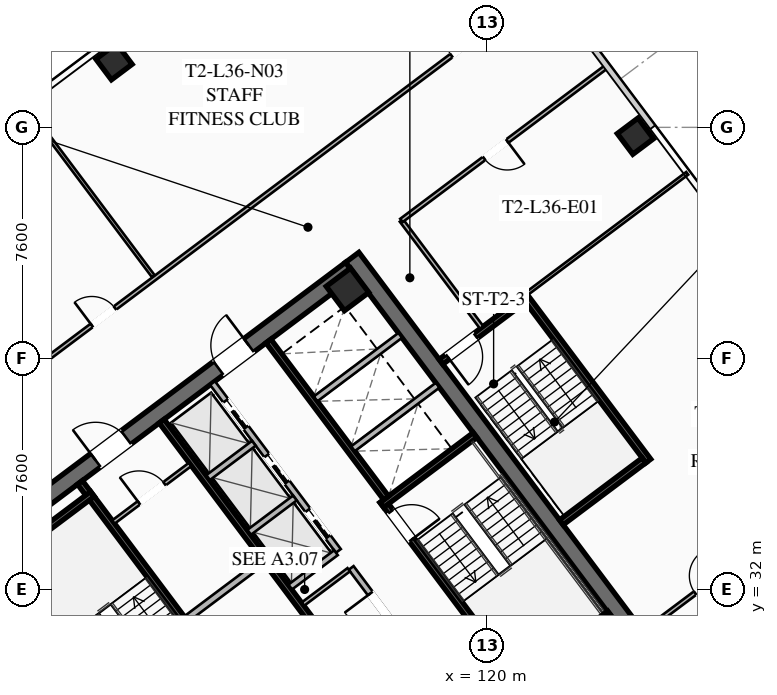
"""IFC4 building model, lengths in metres.
Left out: names, types, materials, properties, quantities, classifications, styles, units other than length and angle.
Written with IfcOpenShell. Run it as: python <this file> out.ifc"""

import sys

from ifc_helpers import new_model, si_unit, direction, frame, frame_2d, origin, origin_2d, place, context, subcontext, project, spatial, rectangle, hollow_rectangle, extrude, element, fill, save


model = new_model("IFC4")
c1 = context("Model", 3, precision=1e-05, world=origin(), true_north=direction((0.0, 1.0)))
c2 = subcontext(c1, "Body", "Model", "MODEL_VIEW")
j1 = project(units=[si_unit("LENGTHUNIT", "METRE"), si_unit("PLANEANGLEUNIT", "RADIAN")], contexts=[c1])
p1 = place(None, origin())
s1 = spatial("IfcSite", under=j1, at=p1, CompositionType="ELEMENT")
p2 = place(p1, origin())
s2 = spatial("IfcBuilding", under=s1, at=p2, CompositionType="ELEMENT")
p3 = place(p2, frame((0.0, 0.0, 135.7)))
s3 = spatial("IfcBuildingStorey", under=s2, at=p3, CompositionType="ELEMENT", Elevation=135.7)
for number, where, z_axis, x_axis in (
    (1, (112.436, 21.077, 0.0), (0.0, 0.0, 1.0), (-0.6, 0.8, 0.0)),
    (2, (115.564, 42.923, 0.0), (0.0, 0.0, 1.0), (0.6, -0.8, 0.0)),
):
    element("IfcWall", number, at=place(p3, frame(where, z_axis=z_axis, x_axis=x_axis)), inside=s3, PredefinedType="SHEAR", context=c2, shape_type="SweptSolid", body=[
        extrude(rectangle(XDim=15.6, YDim=0.55, at=frame_2d((7.8, 0.0))), origin(), (0.0, 0.0, 1.0), 3.55),
    ])
p4 = place(p3, frame((103.461, 33.502, 0.0), z_axis=(0.0, 0.0, 1.0), x_axis=(0.799998054672, 0.600002593761, 0.0)))
e3 = element("IfcWall", 3, at=p4, inside=s3, PredefinedType="SHEAR", context=c2, shape_type="SweptSolid", body=[
    extrude(rectangle(XDim=15.06, YDim=0.55, at=frame_2d((7.53, 0.0))), origin(), (0.0, 0.0, 1.0), 3.55),
])
p5 = place(p4, frame((4.58, 0.0, 0.0)))
e4 = element("IfcOpeningElement", 4, at=p5, cuts=e3, PredefinedType="OPENING", context=c2, shape_type="SweptSolid", body=[
    extrude(rectangle(XDim=1.25, YDim=2.25, at=frame_2d((0.625, 1.125))), frame((0.0, 0.285, 0.0), z_axis=(0.0, -1.0, 0.0), x_axis=(1.0, 0.0, 0.0)), (0.0, 0.0, 1.0), 0.57),
])
p6 = place(p4, frame((9.63, 0.0, 0.0)))
e5 = element("IfcOpeningElement", 5, at=p6, cuts=e3, PredefinedType="OPENING", context=c2, shape_type="SweptSolid", body=[
    extrude(rectangle(XDim=1.25, YDim=2.25, at=frame_2d((0.625, 1.125))), frame((0.0, 0.285, 0.0), z_axis=(0.0, -1.0, 0.0), x_axis=(1.0, 0.0, 0.0)), (0.0, 0.0, 1.0), 0.57),
])
for number, where, z_axis, x_axis in (
    (6, (123.87, 30.59, 0.0), (0.0, 0.0, 1.0), (0.8, 0.6, 0.0)),
    (7, (115.41, 41.87, 0.0), (0.0, 0.0, 1.0), (0.8, 0.6, 0.0)),
):
    element("IfcColumn", number, at=place(p3, frame(where, z_axis=z_axis, x_axis=x_axis)), inside=s3, PredefinedType="COLUMN", context=c2, shape_type="SweptSolid", body=[
        extrude(hollow_rectangle(XDim=1.0, YDim=1.0, WallThickness=0.04, at=origin_2d()), origin(), (0.0, 0.0, 1.0), 3.37),
    ])
for number, where, z_axis, x_axis in (
    (8, (124.88, 46.91, 0.0), (0.0, 0.0, 1.0), (0.8, 0.6, 0.0)),
    (9, (107.73, 49.36, 0.0), (0.0, 0.0, 1.0), (0.8, 0.6, 0.0)),
):
    element("IfcColumn", number, at=place(p3, frame(where, z_axis=z_axis, x_axis=x_axis)), inside=s3, PredefinedType="COLUMN", context=c2, shape_type="SweptSolid", body=[
        extrude(hollow_rectangle(XDim=0.85, YDim=0.85, WallThickness=0.035, at=origin_2d()), origin(), (0.0, 0.0, 1.0), 3.37),
    ])
p7 = place(p3, frame((111.44, 29.08, 0.0), z_axis=(0.0, 0.0, 1.0), x_axis=(-0.59999029481, 0.8000072788, 0.0)))
e10 = element("IfcWall", 10, at=p7, inside=s3, PredefinedType="SHEAR", context=c2, shape_type="SweptSolid", body=[
    extrude(rectangle(XDim=8.05, YDim=0.2, at=frame_2d((4.025, 0.0))), origin(), (0.0, 0.0, 1.0), 3.37),
])
p8 = place(p7, frame((0.45, 0.0, 0.0)))
e11 = element("IfcOpeningElement", 11, at=p8, cuts=e10, PredefinedType="OPENING", context=c2, shape_type="SweptSolid", body=[
    extrude(rectangle(XDim=1.15, YDim=2.2, at=frame_2d((0.575, 1.1))), frame((0.0, 0.11, 0.0), z_axis=(0.0, -1.0, 0.0), x_axis=(1.0, 0.0, 0.0)), (0.0, 0.0, 1.0), 0.22),
])
p9 = place(p3, frame((103.956, 32.842, 0.0), z_axis=(0.0, 0.0, 1.0), x_axis=(0.800015298837, 0.599979601008, 0.0)))
e12 = element("IfcWall", 12, at=p9, inside=s3, PredefinedType="SHEAR", context=c2, shape_type="SweptSolid", body=[
    extrude(rectangle(XDim=3.83, YDim=0.2, at=frame_2d((1.915, 0.0))), origin(), (0.0, 0.0, 1.0), 3.37),
])
p10 = place(p3, frame((116.56, 34.92, 0.0), z_axis=(0.0, 0.0, 1.0), x_axis=(0.59999029481, -0.8000072788, 0.0)))
e13 = element("IfcWall", 13, at=p10, inside=s3, PredefinedType="SHEAR", context=c2, shape_type="SweptSolid", body=[
    extrude(rectangle(XDim=8.05, YDim=0.2, at=frame_2d((4.025, 0.0))), origin(), (0.0, 0.0, 1.0), 3.37),
])
p11 = place(p10, frame((0.45, 0.0, 0.0)))
e14 = element("IfcOpeningElement", 14, at=p11, cuts=e13, PredefinedType="OPENING", context=c2, shape_type="SweptSolid", body=[
    extrude(rectangle(XDim=1.15, YDim=2.2, at=frame_2d((0.575, 1.1))), frame((0.0, 0.11, 0.0), z_axis=(0.0, -1.0, 0.0), x_axis=(1.0, 0.0, 0.0)), (0.0, 0.0, 1.0), 0.22),
])
for number, where, z_axis, x_axis in (
    (15, (116.54, 34.78, 0.0), (0.0, 0.0, 1.0), (0.8, 0.6, 0.0)),
    (16, (120.98, 28.86, 0.0), (0.0, 0.0, 1.0), (0.8, 0.6, 0.0)),
):
    element("IfcWall", number, at=place(p3, frame(where, z_axis=z_axis, x_axis=x_axis)), inside=s3, PredefinedType="SHEAR", context=c2, shape_type="SweptSolid", body=[
        extrude(rectangle(XDim=3.83, YDim=0.2, at=frame_2d((1.915, 0.0))), origin(), (0.0, 0.0, 1.0), 3.37),
    ])
p12 = place(p3, frame((117.998, 25.936, 0.0), z_axis=(0.0, 0.0, 1.0), x_axis=(-0.600002693989, 0.799997979501, 0.0)))
e17 = element("IfcWall", 17, at=p12, inside=s3, PredefinedType="SHEAR", context=c2, shape_type="SweptSolid", body=[
    extrude(rectangle(XDim=14.5, YDim=0.2, at=frame_2d((7.25, 0.0))), origin(), (0.0, 0.0, 1.0), 3.37),
])
p13 = place(p3, frame((110.104, 31.028, 0.0), z_axis=(0.0, 0.0, 1.0), x_axis=(0.800018601094, 0.59997519774, 0.0)))
e18 = element("IfcWall", 18, at=p13, inside=s3, PredefinedType="SOLIDWALL", context=c2, shape_type="SweptSolid", body=[
    extrude(rectangle(XDim=3.15, YDim=0.22, at=frame_2d((1.575, 0.0))), origin(), (0.0, 0.0, 1.0), 2.723),
])
p14 = place(p3, frame((112.81, 40.17, 0.0), z_axis=(0.0, 0.0, 1.0), x_axis=(0.599993943644, -0.800004542231, 0.0)))
e19 = element("IfcWall", 19, at=p14, inside=s3, PredefinedType="SHEAR", context=c2, shape_type="SweptSolid", body=[
    extrude(rectangle(XDim=6.45, YDim=0.2, at=frame_2d((3.225, 0.0))), origin(), (0.0, 0.0, 1.0), 3.37),
])
for number, where, z_axis, x_axis in (
    (20, (115.59, 36.63, 0.0), (0.0, 0.0, 1.0), (0.8, 0.6, 0.0)),
    (21, (114.36, 38.27, 0.0), (0.0, 0.0, 1.0), (0.8, 0.6, 0.0)),
):
    element("IfcWall", number, at=place(p3, frame(where, z_axis=z_axis, x_axis=x_axis)), inside=s3, PredefinedType="SOLIDWALL", context=c2, shape_type="SweptSolid", body=[
        extrude(rectangle(XDim=3.48, YDim=0.2, at=frame_2d((1.74, 0.0))), origin(), (0.0, 0.0, 1.0), 3.37),
    ])
p15 = place(p3, frame((107.71, 34.22, 0.0), z_axis=(0.0, 0.0, 1.0), x_axis=(0.799981399002, 0.60002480053, 0.0)))
e22 = element("IfcWall", 22, at=p15, inside=s3, PredefinedType="PARTITIONING", context=c2, shape_type="SweptSolid", body=[
    extrude(rectangle(XDim=3.15, YDim=0.135, at=frame_2d((1.575, 0.0))), origin(), (0.0, 0.0, 1.0), 2.723),
])
p16 = place(p15, frame((1.05, 0.0, 0.0)))
e23 = element("IfcOpeningElement", 23, at=p16, cuts=e22, PredefinedType="OPENING", context=c2, shape_type="SweptSolid", body=[
    extrude(rectangle(XDim=1.05, YDim=2.2, at=frame_2d((0.525, 1.1))), frame((0.0, 0.077, 0.0), z_axis=(0.0, -1.0, 0.0), x_axis=(1.0, 0.0, 0.0)), (0.0, 0.0, 1.0), 0.155),
])
p17 = place(p3, frame((119.67, 27.19, 0.0), z_axis=(0.0, 0.0, 1.0), x_axis=(-0.599988677396, 0.800008491828, 0.0)))
e24 = element("IfcWall", 24, at=p17, inside=s3, PredefinedType="SOLIDWALL", context=c2, shape_type="SweptSolid", body=[
    extrude(rectangle(XDim=6.9, YDim=0.2, at=frame_2d((3.45, 0.0))), origin(), (0.0, 0.0, 1.0), 2.723),
])
p18 = place(p17, frame((0.85, 0.0, 0.0)))
e25 = element("IfcOpeningElement", 25, at=p18, cuts=e24, PredefinedType="OPENING", context=c2, shape_type="SweptSolid", body=[
    extrude(rectangle(XDim=0.95, YDim=2.05, at=frame_2d((0.475, 1.025))), frame((0.0, 0.11, 0.0), z_axis=(0.0, -1.0, 0.0), x_axis=(1.0, 0.0, 0.0)), (0.0, 0.0, 1.0), 0.22),
])
p19 = place(p17, frame((4.8, 0.0, 0.0)))
e26 = element("IfcOpeningElement", 26, at=p19, cuts=e24, PredefinedType="OPENING", context=c2, shape_type="SweptSolid", body=[
    extrude(rectangle(XDim=1.05, YDim=2.2, at=frame_2d((0.525, 1.1))), frame((0.0, 0.11, 0.0), z_axis=(0.0, -1.0, 0.0), x_axis=(1.0, 0.0, 0.0)), (0.0, 0.0, 1.0), 0.22),
])
p20 = place(p3, frame((113.946, 31.522, 0.0), z_axis=(0.0, 0.0, 1.0), x_axis=(0.8, 0.6, 0.0)))
e27 = element("IfcWall", 27, at=p20, inside=s3, PredefinedType="PARTITIONING", context=c2, shape_type="SweptSolid", body=[
    extrude(rectangle(XDim=1.88, YDim=0.135, at=frame_2d((0.94, 0.0))), origin(), (0.0, 0.0, 1.0), 2.723),
])
p21 = place(p3, frame((115.11, 33.27, 0.0), z_axis=(0.0, 0.0, 1.0), x_axis=(-0.600011322243, 0.799991508192, 0.0)))
e28 = element("IfcWall", 28, at=p21, inside=s3, PredefinedType="SOLIDWALL", context=c2, shape_type="SweptSolid", body=[
    extrude(rectangle(XDim=6.9, YDim=0.2, at=frame_2d((3.45, 0.0))), origin(), (0.0, 0.0, 1.0), 3.37),
])
p22 = place(p21, frame((0.575, 0.0, 0.0)))
e29 = element("IfcOpeningElement", 29, at=p22, cuts=e28, PredefinedType="OPENING", context=c2, shape_type="SweptSolid", body=[
    extrude(rectangle(XDim=1.1, YDim=2.2, at=frame_2d((0.55, 1.1))), frame((0.0, 0.11, 0.0), z_axis=(0.0, -1.0, 0.0), x_axis=(1.0, 0.0, 0.0)), (0.0, 0.0, 1.0), 0.22),
])
p23 = place(p21, frame((2.825, 0.0, 0.0)))
e30 = element("IfcOpeningElement", 30, at=p23, cuts=e28, PredefinedType="OPENING", context=c2, shape_type="SweptSolid", body=[
    extrude(rectangle(XDim=1.1, YDim=2.2, at=frame_2d((0.55, 1.1))), frame((0.0, 0.11, 0.0), z_axis=(0.0, -1.0, 0.0), x_axis=(1.0, 0.0, 0.0)), (0.0, 0.0, 1.0), 0.22),
])
p24 = place(p21, frame((5.075, 0.0, 0.0)))
e31 = element("IfcOpeningElement", 31, at=p24, cuts=e28, PredefinedType="OPENING", context=c2, shape_type="SweptSolid", body=[
    extrude(rectangle(XDim=1.1, YDim=2.2, at=frame_2d((0.55, 1.1))), frame((0.0, 0.11, 0.0), z_axis=(0.0, -1.0, 0.0), x_axis=(1.0, 0.0, 0.0)), (0.0, 0.0, 1.0), 0.22),
])
p25 = place(p3, frame((113.526, 32.082, 0.0), z_axis=(0.0, 0.0, 1.0), x_axis=(0.800046745961, 0.599937666993, 0.0)))
e32 = element("IfcWall", 32, at=p25, inside=s3, PredefinedType="SOLIDWALL", context=c2, shape_type="SweptSolid", body=[
    extrude(rectangle(XDim=1.88, YDim=0.2, at=frame_2d((0.94, 0.0))), origin(), (0.0, 0.0, 1.0), 3.37),
])
p26 = place(p3, frame((112.176, 33.882, 0.0), z_axis=(0.0, 0.0, 1.0), x_axis=(0.8, 0.6, 0.0)))
e33 = element("IfcWall", 33, at=p26, inside=s3, PredefinedType="SOLIDWALL", context=c2, shape_type="SweptSolid", body=[
    extrude(rectangle(XDim=1.88, YDim=0.2, at=frame_2d((0.94, 0.0))), origin(), (0.0, 0.0, 1.0), 3.37),
])
p27 = place(p3, frame((110.826, 35.682, 0.0), z_axis=(0.0, 0.0, 1.0), x_axis=(0.799984418148, 0.600020775241, 0.0)))
e34 = element("IfcWall", 34, at=p27, inside=s3, PredefinedType="SOLIDWALL", context=c2, shape_type="SweptSolid", body=[
    extrude(rectangle(XDim=1.88, YDim=0.2, at=frame_2d((0.94, 0.0))), origin(), (0.0, 0.0, 1.0), 3.37),
])
p28 = place(p3, frame((125.304, 36.228, 0.0), z_axis=(0.0, 0.0, 1.0), x_axis=(-0.59998851072, 0.800008616831, 0.0)))
e35 = element("IfcWall", 35, at=p28, inside=s3, PredefinedType="SHEAR", context=c2, shape_type="SweptSolid", body=[
    extrude(rectangle(XDim=6.8, YDim=0.2, at=frame_2d((3.4, 0.0))), origin(), (0.0, 0.0, 1.0), 3.37),
])
p29 = place(p3, frame((121.204, 41.528, 0.0), z_axis=(0.0, 0.0, 1.0), x_axis=(-0.800017232136, -0.599977023131, 0.0)))
e36 = element("IfcWall", 36, at=p29, inside=s3, PredefinedType="SHEAR", context=c2, shape_type="SweptSolid", body=[
    extrude(rectangle(XDim=3.4, YDim=0.2, at=frame_2d((1.7, 0.0))), origin(), (0.0, 0.0, 1.0), 3.37),
])
p30 = place(p29, frame((1.975, 0.0, 0.0)))
e37 = element("IfcOpeningElement", 37, at=p30, cuts=e36, PredefinedType="OPENING", context=c2, shape_type="SweptSolid", body=[
    extrude(rectangle(XDim=1.15, YDim=2.2, at=frame_2d((0.575, 1.1))), frame((0.0, 0.11, 0.0), z_axis=(0.0, -1.0, 0.0), x_axis=(1.0, 0.0, 0.0)), (0.0, 0.0, 1.0), 0.22),
])
p31 = place(p3, frame((122.444, 34.208, 0.0), z_axis=(0.0, 0.0, 1.0), x_axis=(0.79999138319, 0.600011488909, 0.0)))
e38 = element("IfcWall", 38, at=p31, inside=s3, PredefinedType="SHEAR", context=c2, shape_type="SweptSolid", body=[
    extrude(rectangle(XDim=3.4, YDim=0.2, at=frame_2d((1.7, 0.0))), origin(), (0.0, 0.0, 1.0), 3.37),
])
p32 = place(p3, frame((119.824, 40.618, 0.0), z_axis=(0.0, 0.0, 1.0), x_axis=(-0.599982243973, 0.800013316712, 0.0)))
e39 = element("IfcWall", 39, at=p32, inside=s3, PredefinedType="PARTITIONING", context=c2, shape_type="SweptSolid", body=[
    extrude(rectangle(XDim=4.4, YDim=0.135, at=frame_2d((2.2, 0.0))), origin(), (0.0, 0.0, 1.0), 2.723),
])
p33 = place(p3, frame((94.79, 31.53, 0.0), z_axis=(0.0, 0.0, 1.0), x_axis=(0.8, 0.6, 0.0)))
e40 = element("IfcWall", 40, at=p33, inside=s3, PredefinedType="PARTITIONING", context=c2, shape_type="SweptSolid", body=[
    extrude(rectangle(XDim=31.3, YDim=0.135, at=frame_2d((15.65, 0.0))), origin(), (0.0, 0.0, 1.0), 2.723),
])
p34 = place(p33, frame((0.3, 0.0, 0.0)))
e41 = element("IfcOpeningElement", 41, at=p34, cuts=e40, PredefinedType="OPENING", context=c2, shape_type="SweptSolid", body=[
    extrude(rectangle(XDim=0.95, YDim=2.05, at=frame_2d((0.475, 1.025))), frame((0.0, 0.077, 0.0), z_axis=(0.0, -1.0, 0.0), x_axis=(1.0, 0.0, 0.0)), (0.0, 0.0, 1.0), 0.155),
])
p35 = place(p33, frame((15.263, 0.0, 0.0)))
e42 = element("IfcOpeningElement", 42, at=p35, cuts=e40, PredefinedType="OPENING", context=c2, shape_type="SweptSolid", body=[
    extrude(rectangle(XDim=0.95, YDim=2.05, at=frame_2d((0.475, 1.025))), frame((0.0, 0.077, 0.0), z_axis=(0.0, -1.0, 0.0), x_axis=(1.0, 0.0, 0.0)), (0.0, 0.0, 1.0), 0.155),
])
p36 = place(p33, frame((30.05, 0.0, 0.0)))
e43 = element("IfcOpeningElement", 43, at=p36, cuts=e40, PredefinedType="OPENING", context=c2, shape_type="SweptSolid", body=[
    extrude(rectangle(XDim=0.95, YDim=2.05, at=frame_2d((0.475, 1.025))), frame((0.0, 0.077, 0.0), z_axis=(0.0, -1.0, 0.0), x_axis=(1.0, 0.0, 0.0)), (0.0, 0.0, 1.0), 0.155),
])
p37 = place(p3, frame((109.022, 42.304, 0.0), z_axis=(0.0, 0.0, 1.0), x_axis=(-0.599988918536, 0.800008310978, 0.0)))
e44 = element("IfcWall", 44, at=p37, inside=s3, PredefinedType="PARTITIONING", context=c2, shape_type="SweptSolid", body=[
    extrude(rectangle(XDim=7.05, YDim=0.11, at=frame_2d((3.525, 0.0))), origin(), (0.0, 0.0, 1.0), 2.723),
])
p38 = place(p3, frame((133.102, 32.614, 0.0), z_axis=(0.0, 0.0, 1.0), x_axis=(-0.8, -0.6, 0.0)))
e45 = element("IfcWall", 45, at=p38, inside=s3, PredefinedType="PARTITIONING", context=c2, shape_type="SweptSolid", body=[
    extrude(rectangle(XDim=31.3, YDim=0.135, at=frame_2d((15.65, 0.0))), origin(), (0.0, 0.0, 1.0), 2.723),
])
p39 = place(p38, frame((29.97, 0.0, 0.0)))
e46 = element("IfcOpeningElement", 46, at=p39, cuts=e45, PredefinedType="OPENING", context=c2, shape_type="SweptSolid", body=[
    extrude(rectangle(XDim=0.95, YDim=2.05, at=frame_2d((0.475, 1.025))), frame((0.0, 0.077, 0.0), z_axis=(0.0, -1.0, 0.0), x_axis=(1.0, 0.0, 0.0)), (0.0, 0.0, 1.0), 0.155),
])
p40 = place(p38, frame((0.38, 0.0, 0.0)))
e47 = element("IfcOpeningElement", 47, at=p40, cuts=e45, PredefinedType="OPENING", context=c2, shape_type="SweptSolid", body=[
    extrude(rectangle(XDim=0.95, YDim=2.05, at=frame_2d((0.475, 1.025))), frame((0.0, 0.077, 0.0), z_axis=(0.0, -1.0, 0.0), x_axis=(1.0, 0.0, 0.0)), (0.0, 0.0, 1.0), 0.155),
])
p41 = place(p3, frame((123.944, 49.208, 0.0), z_axis=(0.0, 0.0, 1.0), x_axis=(-0.799996532921, -0.600004622744, 0.0)))
e48 = element("IfcWall", 48, at=p41, inside=s3, PredefinedType="PARTITIONING", context=c2, shape_type="SweptSolid", body=[
    extrude(rectangle(XDim=8.45, YDim=0.135, at=frame_2d((4.225, 0.0))), origin(), (0.0, 0.0, 1.0), 2.723),
])
p42 = place(p41, frame((4.1, 0.0, 0.0)))
e49 = element("IfcOpeningElement", 49, at=p42, cuts=e48, PredefinedType="OPENING", context=c2, shape_type="SweptSolid", body=[
    extrude(rectangle(XDim=0.95, YDim=2.05, at=frame_2d((0.475, 1.025))), frame((0.0, 0.077, 0.0), z_axis=(0.0, -1.0, 0.0), x_axis=(1.0, 0.0, 0.0)), (0.0, 0.0, 1.0), 0.155),
])
p43 = place(p3, frame((125.208, 30.656, 0.0), z_axis=(0.0, 0.0, 1.0), x_axis=(0.799997105034, 0.600003859935, 0.0)))
e50 = element("IfcWall", 50, at=p43, inside=s3, PredefinedType="PARTITIONING", context=c2, shape_type="SweptSolid", body=[
    extrude(rectangle(XDim=10.12, YDim=0.135, at=frame_2d((5.06, 0.0))), origin(), (0.0, 0.0, 1.0), 2.723),
])
p44 = place(p43, frame((2.045, 0.0, 0.0)))
e51 = element("IfcOpeningElement", 51, at=p44, cuts=e50, PredefinedType="OPENING", context=c2, shape_type="SweptSolid", body=[
    extrude(rectangle(XDim=0.95, YDim=2.05, at=frame_2d((0.475, 1.025))), frame((0.0, 0.077, 0.0), z_axis=(0.0, -1.0, 0.0), x_axis=(1.0, 0.0, 0.0)), (0.0, 0.0, 1.0), 0.155),
])
p45 = place(p3, frame((126.584, 45.688, 0.0), z_axis=(0.0, 0.0, 1.0), x_axis=(-0.800004438899, -0.599994081423, 0.0)))
e52 = element("IfcWall", 52, at=p45, inside=s3, PredefinedType="PARTITIONING", context=c2, shape_type="SweptSolid", body=[
    extrude(rectangle(XDim=6.6, YDim=0.11, at=frame_2d((3.3, 0.0))), origin(), (0.0, 0.0, 1.0), 2.723),
])
p46 = place(p3, frame((112.104, 20.928, 0.0), z_axis=(0.0, 0.0, 1.0), x_axis=(-0.599994940075, 0.800003794918, 0.0)))
e53 = element("IfcWall", 53, at=p46, inside=s3, PredefinedType="PARTITIONING", context=c2, shape_type="SweptSolid", body=[
    extrude(rectangle(XDim=15.44, YDim=0.135, at=frame_2d((7.72, 0.0))), origin(), (0.0, 0.0, 1.0), 2.723),
])
p47 = place(p5, origin())
e54 = element("IfcDoor", 54, at=p47, inside=s3, OperationType="SINGLE_SWING_LEFT", PredefinedType="DOOR", context=c2, shape_type="SweptSolid", body=[
    extrude(rectangle(XDim=1.25, YDim=2.25, at=frame_2d((0.625, 1.125))), frame((0.0, 0.025, 0.0), z_axis=(0.0, -1.0, 0.0), x_axis=(1.0, 0.0, 0.0)), (0.0, 0.0, 1.0), 0.05),
])
fill(e4, e54)
p48 = place(p6, origin())
e55 = element("IfcDoor", 55, at=p48, inside=s3, OperationType="SINGLE_SWING_RIGHT", PredefinedType="DOOR", context=c2, shape_type="SweptSolid", body=[
    extrude(rectangle(XDim=1.25, YDim=2.25, at=frame_2d((0.625, 1.125))), frame((0.0, 0.025, 0.0), z_axis=(0.0, -1.0, 0.0), x_axis=(1.0, 0.0, 0.0)), (0.0, 0.0, 1.0), 0.05),
])
fill(e5, e55)
p49 = place(p11, origin())
e56 = element("IfcDoor", 56, at=p49, inside=s3, OperationType="SINGLE_SWING_RIGHT", PredefinedType="DOOR", context=c2, shape_type="SweptSolid", body=[
    extrude(rectangle(XDim=1.15, YDim=2.2, at=frame_2d((0.575, 1.1))), frame((0.0, 0.025, 0.0), z_axis=(0.0, -1.0, 0.0), x_axis=(1.0, 0.0, 0.0)), (0.0, 0.0, 1.0), 0.05),
])
fill(e14, e56)
p50 = place(p16, origin())
e57 = element("IfcDoor", 57, at=p50, inside=s3, OperationType="SINGLE_SWING_LEFT", PredefinedType="DOOR", context=c2, shape_type="SweptSolid", body=[
    extrude(rectangle(XDim=1.05, YDim=2.2, at=frame_2d((0.525, 1.1))), frame((0.0, 0.025, 0.0), z_axis=(0.0, -1.0, 0.0), x_axis=(1.0, 0.0, 0.0)), (0.0, 0.0, 1.0), 0.05),
])
fill(e23, e57)
p51 = place(p19, origin())
e58 = element("IfcDoor", 58, at=p51, inside=s3, OperationType="SINGLE_SWING_RIGHT", PredefinedType="DOOR", context=c2, shape_type="SweptSolid", body=[
    extrude(rectangle(XDim=1.05, YDim=2.2, at=frame_2d((0.525, 1.1))), frame((0.0, 0.025, 0.0), z_axis=(0.0, -1.0, 0.0), x_axis=(1.0, 0.0, 0.0)), (0.0, 0.0, 1.0), 0.05),
])
fill(e26, e58)
p52 = place(p30, origin())
e59 = element("IfcDoor", 59, at=p52, inside=s3, OperationType="SINGLE_SWING_RIGHT", PredefinedType="DOOR", context=c2, shape_type="SweptSolid", body=[
    extrude(rectangle(XDim=1.15, YDim=2.2, at=frame_2d((0.575, 1.1))), frame((0.0, 0.025, 0.0), z_axis=(0.0, -1.0, 0.0), x_axis=(1.0, 0.0, 0.0)), (0.0, 0.0, 1.0), 0.05),
])
fill(e37, e59)
p53 = place(p35, origin())
e60 = element("IfcDoor", 60, at=p53, inside=s3, OperationType="SINGLE_SWING_LEFT", PredefinedType="DOOR", context=c2, shape_type="SweptSolid", body=[
    extrude(rectangle(XDim=0.95, YDim=2.05, at=frame_2d((0.475, 1.025))), frame((0.0, 0.025, 0.0), z_axis=(0.0, -1.0, 0.0), x_axis=(1.0, 0.0, 0.0)), (0.0, 0.0, 1.0), 0.05),
])
fill(e42, e60)
p54 = place(p36, origin())
e61 = element("IfcDoor", 61, at=p54, inside=s3, OperationType="SINGLE_SWING_RIGHT", PredefinedType="DOOR", context=c2, shape_type="SweptSolid", body=[
    extrude(rectangle(XDim=0.95, YDim=2.05, at=frame_2d((0.475, 1.025))), frame((0.0, 0.025, 0.0), z_axis=(0.0, -1.0, 0.0), x_axis=(1.0, 0.0, 0.0)), (0.0, 0.0, 1.0), 0.05),
])
fill(e43, e61)
p55 = place(p42, origin())
e62 = element("IfcDoor", 62, at=p55, inside=s3, OperationType="SINGLE_SWING_LEFT", PredefinedType="DOOR", context=c2, shape_type="SweptSolid", body=[
    extrude(rectangle(XDim=0.95, YDim=2.05, at=frame_2d((0.475, 1.025))), frame((0.0, 0.025, 0.0), z_axis=(0.0, -1.0, 0.0), x_axis=(1.0, 0.0, 0.0)), (0.0, 0.0, 1.0), 0.05),
])
fill(e49, e62)
p56 = place(p44, origin())
e63 = element("IfcDoor", 63, at=p56, inside=s3, OperationType="SINGLE_SWING_RIGHT", PredefinedType="DOOR", context=c2, shape_type="SweptSolid", body=[
    extrude(rectangle(XDim=0.95, YDim=2.05, at=frame_2d((0.475, 1.025))), frame((0.0, 0.025, 0.0), z_axis=(0.0, -1.0, 0.0), x_axis=(1.0, 0.0, 0.0)), (0.0, 0.0, 1.0), 0.05),
])
fill(e51, e63)
p57 = place(p22, origin())
e64 = element("IfcDoor", 64, at=p57, inside=s3, OperationType="SLIDING_TO_LEFT", PredefinedType="DOOR", context=c2, shape_type="SweptSolid", body=[
    extrude(rectangle(XDim=1.1, YDim=2.2, at=frame_2d((0.55, 1.1))), frame((0.0, 0.025, 0.0), z_axis=(0.0, -1.0, 0.0), x_axis=(1.0, 0.0, 0.0)), (0.0, 0.0, 1.0), 0.05),
])
fill(e29, e64)
p58 = place(p23, origin())
e65 = element("IfcDoor", 65, at=p58, inside=s3, OperationType="SLIDING_TO_LEFT", PredefinedType="DOOR", context=c2, shape_type="SweptSolid", body=[
    extrude(rectangle(XDim=1.1, YDim=2.2, at=frame_2d((0.55, 1.1))), frame((0.0, 0.025, 0.0), z_axis=(0.0, -1.0, 0.0), x_axis=(1.0, 0.0, 0.0)), (0.0, 0.0, 1.0), 0.05),
])
fill(e30, e65)
p59 = place(p24, origin())
e66 = element("IfcDoor", 66, at=p59, inside=s3, OperationType="SLIDING_TO_LEFT", PredefinedType="DOOR", context=c2, shape_type="SweptSolid", body=[
    extrude(rectangle(XDim=1.1, YDim=2.2, at=frame_2d((0.55, 1.1))), frame((0.0, 0.025, 0.0), z_axis=(0.0, -1.0, 0.0), x_axis=(1.0, 0.0, 0.0)), (0.0, 0.0, 1.0), 0.05),
])
fill(e31, e66)
save(model, sys.argv[1])
